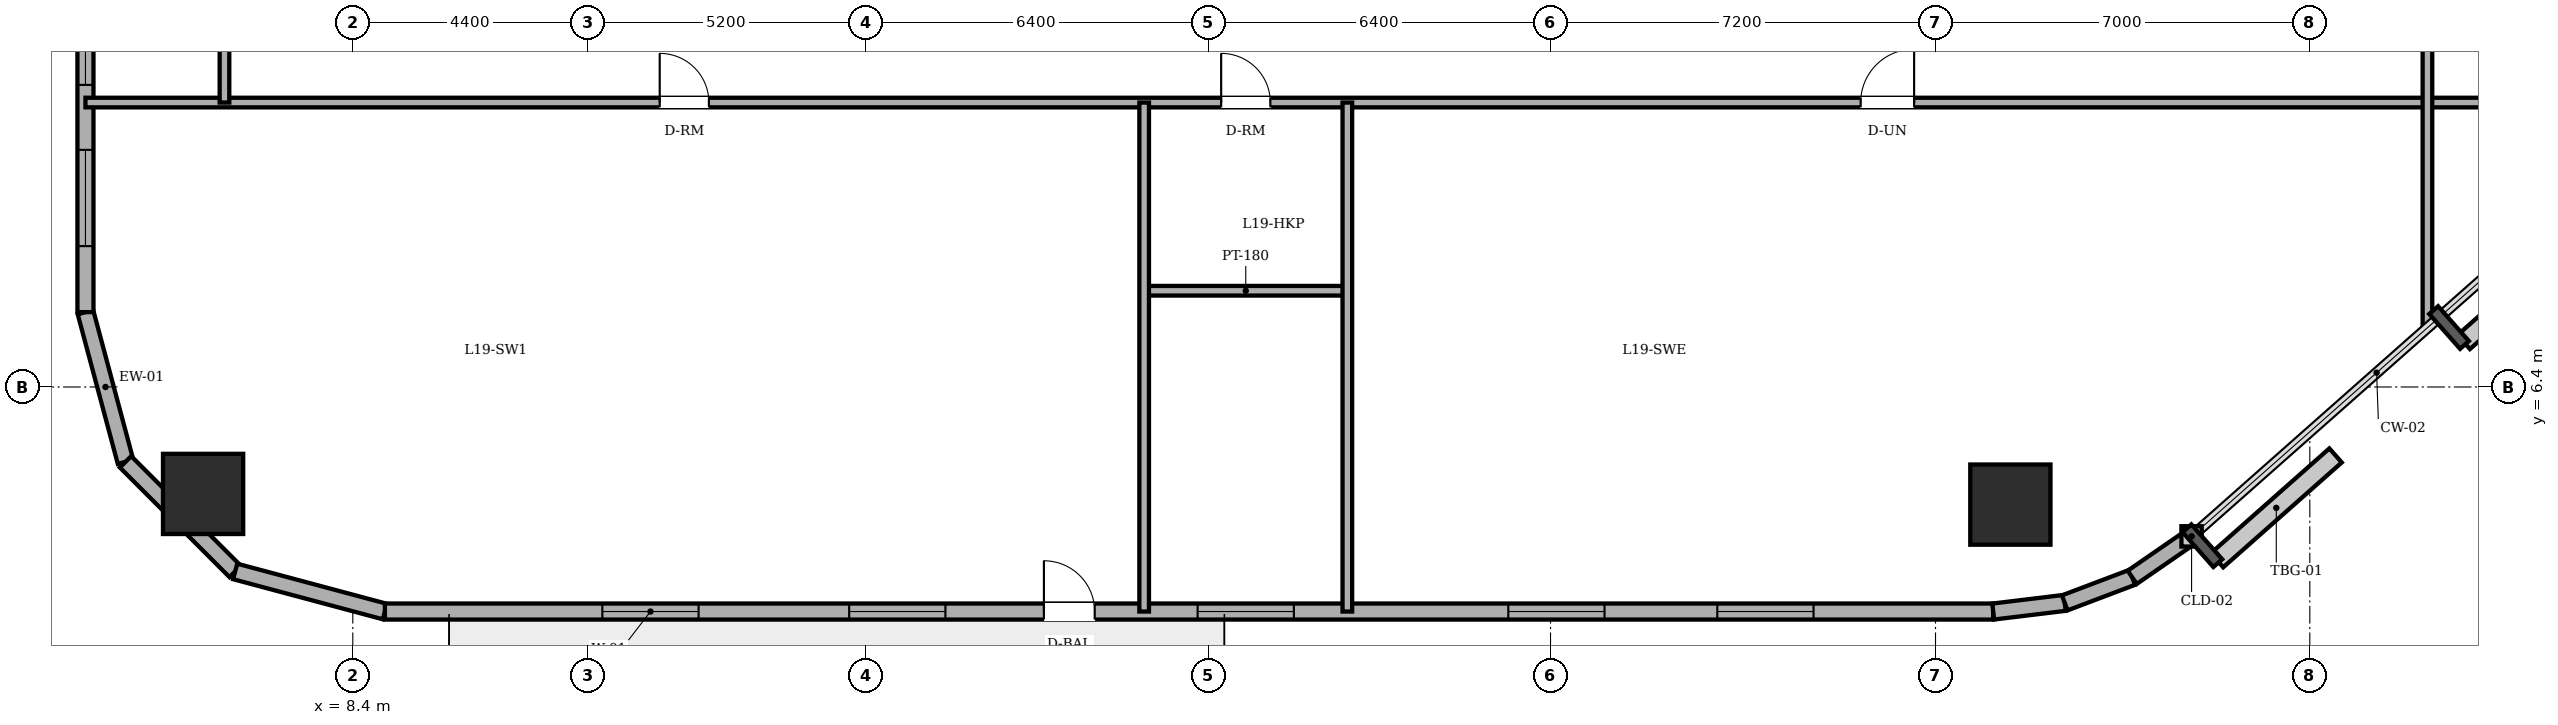
"""IFC4 building model, lengths in metres.
Left out: names, types, materials, properties, quantities, classifications, styles, units other than length and angle.
Written with IfcOpenShell. Run it as: python <this file> out.ifc"""

import sys

from ifc_helpers import new_model, si_unit, direction, frame, frame_2d, origin, origin_2d, place, context, subcontext, project, spatial, rectangle, circle, extrude, element, fill, save


model = new_model("IFC4")
c1 = context("Model", 3, precision=1e-05, world=origin(), true_north=direction((0.0, 1.0)))
c2 = subcontext(c1, "Body", "Model", "MODEL_VIEW")
j1 = project(units=[si_unit("LENGTHUNIT", "METRE"), si_unit("PLANEANGLEUNIT", "RADIAN")], contexts=[c1])
p1 = place(None, origin())
s1 = spatial("IfcSite", under=j1, at=p1, CompositionType="ELEMENT")
p2 = place(p1, origin())
s2 = spatial("IfcBuilding", under=s1, at=p2, CompositionType="ELEMENT")
p3 = place(p2, frame((0.0, 0.0, 72.0)))
s3 = spatial("IfcBuildingStorey", under=s2, at=p3, CompositionType="ELEMENT", Elevation=72.0)
for number, where, z_axis, x_axis in (
    (1, (5.6, 4.4, 0.0), (0.0, 0.0, 1.0), (1.0, 0.0, 0.0)),
    (2, (39.4, 4.2, 0.0), (0.0, 0.0, 1.0), (1.0, 0.0, 0.0)),
):
    element("IfcColumn", number, at=place(p3, frame(where, z_axis=z_axis, x_axis=x_axis)), inside=s3, PredefinedType="COLUMN", context=c2, shape_type="SweptSolid", body=[
        extrude(circle(Radius=0.75, at=origin_2d()), origin(), (0.0, 0.0, 1.0), 3.6),
    ])
p4 = place(p3, frame((3.4, 7.8, 0.0), z_axis=(0.0, 0.0, 1.0), x_axis=(0.258731875344, -0.96594917914, 0.0)))
e3 = element("IfcWall", 3, at=p4, inside=s3, PredefinedType="SOLIDWALL", context=c2, shape_type="SweptSolid", body=[
    extrude(rectangle(XDim=2.899, YDim=0.3, at=frame_2d((1.449, 0.0))), origin(), (0.0, 0.0, 1.0), 3.36),
])
p5 = place(p3, frame((4.15, 5.0, 0.0), z_axis=(0.0, 0.0, 1.0), x_axis=(0.707106781187, -0.707106781187, 0.0)))
e4 = element("IfcWall", 4, at=p5, inside=s3, PredefinedType="SOLIDWALL", context=c2, shape_type="SweptSolid", body=[
    extrude(rectangle(XDim=2.899, YDim=0.3, at=frame_2d((1.45, 0.0))), origin(), (0.0, 0.0, 1.0), 3.36),
])
p6 = place(p3, frame((6.2, 2.95, 0.0), z_axis=(0.0, 0.0, 1.0), x_axis=(0.96594917914, -0.258731875344, 0.0)))
e5 = element("IfcWall", 5, at=p6, inside=s3, PredefinedType="SOLIDWALL", context=c2, shape_type="SweptSolid", body=[
    extrude(rectangle(XDim=2.899, YDim=0.3, at=frame_2d((1.449, 0.0))), origin(), (0.0, 0.0, 1.0), 3.36),
])
p7 = place(p3, frame((9.0, 2.2, 0.0), z_axis=(0.0, 0.0, 1.0), x_axis=(1.0, 0.0, 0.0)))
e6 = element("IfcWall", 6, at=p7, inside=s3, PredefinedType="SOLIDWALL", context=c2, shape_type="SweptSolid", body=[
    extrude(rectangle(XDim=30.079, YDim=0.3, at=frame_2d((15.04, 0.0))), origin(), (0.0, 0.0, 1.0), 3.36),
])
p8 = place(p7, frame((12.325, 0.0, 0.0)))
e7 = element("IfcOpeningElement", 7, at=p8, cuts=e6, PredefinedType="OPENING", context=c2, shape_type="SweptSolid", body=[
    extrude(rectangle(XDim=0.95, YDim=2.2, at=frame_2d((0.475, 1.1))), frame((0.0, 0.16, 0.0), z_axis=(0.0, -1.0, 0.0), x_axis=(1.0, 0.0, 0.0)), (0.0, 0.0, 1.0), 0.32),
])
p9 = place(p7, frame((4.067, 0.0, 0.85)))
e8 = element("IfcOpeningElement", 8, at=p9, cuts=e6, PredefinedType="OPENING", context=c2, shape_type="SweptSolid", body=[
    extrude(rectangle(XDim=1.8, YDim=1.55, at=frame_2d((0.9, 0.775))), frame((0.0, 0.16, 0.0), z_axis=(0.0, -1.0, 0.0), x_axis=(1.0, 0.0, 0.0)), (0.0, 0.0, 1.0), 0.32),
])
p10 = place(p7, frame((8.683, 0.0, 0.85)))
e9 = element("IfcOpeningElement", 9, at=p10, cuts=e6, PredefinedType="OPENING", context=c2, shape_type="SweptSolid", body=[
    extrude(rectangle(XDim=1.8, YDim=1.55, at=frame_2d((0.9, 0.775))), frame((0.0, 0.16, 0.0), z_axis=(0.0, -1.0, 0.0), x_axis=(1.0, 0.0, 0.0)), (0.0, 0.0, 1.0), 0.32),
])
p11 = place(p7, frame((15.2, 0.0, 0.85)))
e10 = element("IfcOpeningElement", 10, at=p11, cuts=e6, PredefinedType="OPENING", context=c2, shape_type="SweptSolid", body=[
    extrude(rectangle(XDim=1.8, YDim=1.55, at=frame_2d((0.9, 0.775))), frame((0.0, 0.16, 0.0), z_axis=(0.0, -1.0, 0.0), x_axis=(1.0, 0.0, 0.0)), (0.0, 0.0, 1.0), 0.32),
])
p12 = place(p7, frame((21.01, 0.0, 0.85)))
e11 = element("IfcOpeningElement", 11, at=p12, cuts=e6, PredefinedType="OPENING", context=c2, shape_type="SweptSolid", body=[
    extrude(rectangle(XDim=1.8, YDim=1.55, at=frame_2d((0.9, 0.775))), frame((0.0, 0.16, 0.0), z_axis=(0.0, -1.0, 0.0), x_axis=(1.0, 0.0, 0.0)), (0.0, 0.0, 1.0), 0.32),
])
p13 = place(p7, frame((24.919, 0.0, 0.85)))
e12 = element("IfcOpeningElement", 12, at=p13, cuts=e6, PredefinedType="OPENING", context=c2, shape_type="SweptSolid", body=[
    extrude(rectangle(XDim=1.8, YDim=1.55, at=frame_2d((0.9, 0.775))), frame((0.0, 0.16, 0.0), z_axis=(0.0, -1.0, 0.0), x_axis=(1.0, 0.0, 0.0)), (0.0, 0.0, 1.0), 0.32),
])
p14 = place(p3, frame((39.079, 2.2, 0.0), z_axis=(0.0, 0.0, 1.0), x_axis=(0.992739027259, 0.120288086515, 0.0)))
e13 = element("IfcWall", 13, at=p14, inside=s3, PredefinedType="SOLIDWALL", context=c2, shape_type="SweptSolid", body=[
    extrude(rectangle(XDim=1.348, YDim=0.3, at=frame_2d((0.674, 0.0))), origin(), (0.0, 0.0, 1.0), 3.36),
])
p15 = place(p3, frame((40.417, 2.362, 0.0), z_axis=(0.0, 0.0, 1.0), x_axis=(0.935156721165, 0.354234254216, 0.0)))
e14 = element("IfcWall", 14, at=p15, inside=s3, PredefinedType="SOLIDWALL", context=c2, shape_type="SweptSolid", body=[
    extrude(rectangle(XDim=1.349, YDim=0.3, at=frame_2d((0.675, 0.0))), origin(), (0.0, 0.0, 1.0), 3.36),
])
p16 = place(p3, frame((41.679, 2.84, 0.0), z_axis=(0.0, 0.0, 1.0), x_axis=(0.823116500192, 0.567872544777, 0.0)))
e15 = element("IfcWall", 15, at=p16, inside=s3, PredefinedType="SOLIDWALL", context=c2, shape_type="SweptSolid", body=[
    extrude(rectangle(XDim=1.349, YDim=0.3, at=frame_2d((0.674, 0.0))), origin(), (0.0, 0.0, 1.0), 3.36),
])
p17 = place(p3, frame((3.4, 40.2, 0.0), z_axis=(0.0, 0.0, 1.0), x_axis=(0.0, -1.0, 0.0)))
e16 = element("IfcWall", 16, at=p17, inside=s3, PredefinedType="SOLIDWALL", context=c2, shape_type="SweptSolid", body=[
    extrude(rectangle(XDim=32.4, YDim=0.3, at=frame_2d((16.2, 0.0))), origin(), (0.0, 0.0, 1.0), 3.36),
])
p18 = place(p17, frame((1.235, 0.0, 0.85)))
e17 = element("IfcOpeningElement", 17, at=p18, cuts=e16, PredefinedType="OPENING", context=c2, shape_type="SweptSolid", body=[
    extrude(rectangle(XDim=1.8, YDim=1.55, at=frame_2d((0.9, 0.775))), frame((0.0, 0.16, 0.0), z_axis=(0.0, -1.0, 0.0), x_axis=(1.0, 0.0, 0.0)), (0.0, 0.0, 1.0), 0.32),
])
p19 = place(p17, frame((4.25, 0.0, 0.85)))
e18 = element("IfcOpeningElement", 18, at=p19, cuts=e16, PredefinedType="OPENING", context=c2, shape_type="SweptSolid", body=[
    extrude(rectangle(XDim=1.8, YDim=1.55, at=frame_2d((0.9, 0.775))), frame((0.0, 0.16, 0.0), z_axis=(0.0, -1.0, 0.0), x_axis=(1.0, 0.0, 0.0)), (0.0, 0.0, 1.0), 0.32),
])
p20 = place(p17, frame((9.253, 0.0, 0.85)))
e19 = element("IfcOpeningElement", 19, at=p20, cuts=e16, PredefinedType="OPENING", context=c2, shape_type="SweptSolid", body=[
    extrude(rectangle(XDim=1.8, YDim=1.55, at=frame_2d((0.9, 0.775))), frame((0.0, 0.16, 0.0), z_axis=(0.0, -1.0, 0.0), x_axis=(1.0, 0.0, 0.0)), (0.0, 0.0, 1.0), 0.32),
])
p21 = place(p17, frame((13.027, 0.0, 0.85)))
e20 = element("IfcOpeningElement", 20, at=p21, cuts=e16, PredefinedType="OPENING", context=c2, shape_type="SweptSolid", body=[
    extrude(rectangle(XDim=1.8, YDim=1.55, at=frame_2d((0.9, 0.775))), frame((0.0, 0.16, 0.0), z_axis=(0.0, -1.0, 0.0), x_axis=(1.0, 0.0, 0.0)), (0.0, 0.0, 1.0), 0.32),
])
p22 = place(p17, frame((19.573, 0.0, 0.85)))
e21 = element("IfcOpeningElement", 21, at=p22, cuts=e16, PredefinedType="OPENING", context=c2, shape_type="SweptSolid", body=[
    extrude(rectangle(XDim=1.8, YDim=1.55, at=frame_2d((0.9, 0.775))), frame((0.0, 0.16, 0.0), z_axis=(0.0, -1.0, 0.0), x_axis=(1.0, 0.0, 0.0)), (0.0, 0.0, 1.0), 0.32),
])
p23 = place(p17, frame((22.347, 0.0, 0.85)))
e22 = element("IfcOpeningElement", 22, at=p23, cuts=e16, PredefinedType="OPENING", context=c2, shape_type="SweptSolid", body=[
    extrude(rectangle(XDim=1.8, YDim=1.55, at=frame_2d((0.9, 0.775))), frame((0.0, 0.16, 0.0), z_axis=(0.0, -1.0, 0.0), x_axis=(1.0, 0.0, 0.0)), (0.0, 0.0, 1.0), 0.32),
])
p24 = place(p17, frame((26.35, 0.0, 0.85)))
e23 = element("IfcOpeningElement", 23, at=p24, cuts=e16, PredefinedType="OPENING", context=c2, shape_type="SweptSolid", body=[
    extrude(rectangle(XDim=1.8, YDim=1.55, at=frame_2d((0.9, 0.775))), frame((0.0, 0.16, 0.0), z_axis=(0.0, -1.0, 0.0), x_axis=(1.0, 0.0, 0.0)), (0.0, 0.0, 1.0), 0.32),
])
p25 = place(p17, frame((29.365, 0.0, 0.85)))
e24 = element("IfcOpeningElement", 24, at=p25, cuts=e16, PredefinedType="OPENING", context=c2, shape_type="SweptSolid", body=[
    extrude(rectangle(XDim=1.8, YDim=1.55, at=frame_2d((0.9, 0.775))), frame((0.0, 0.16, 0.0), z_axis=(0.0, -1.0, 0.0), x_axis=(1.0, 0.0, 0.0)), (0.0, 0.0, 1.0), 0.32),
])
p26 = place(p3, frame((23.2, 8.2, 0.0), z_axis=(0.0, 0.0, 1.0), x_axis=(1.0, 0.0, 0.0)))
e25 = element("IfcWall", 25, at=p26, inside=s3, PredefinedType="PARTITIONING", context=c2, shape_type="SweptSolid", body=[
    extrude(rectangle(XDim=3.8, YDim=0.18, at=frame_2d((1.9, 0.0))), origin(), (0.0, 0.0, 1.0), 3.36),
])
p27 = place(p3, frame((3.4, 11.72, 0.0), z_axis=(0.0, 0.0, 1.0), x_axis=(1.0, 0.0, 0.0)))
e26 = element("IfcWall", 26, at=p27, inside=s3, PredefinedType="PARTITIONING", context=c2, shape_type="SweptSolid", body=[
    extrude(rectangle(XDim=47.689, YDim=0.18, at=frame_2d((23.845, 0.0))), origin(), (0.0, 0.0, 1.0), 3.36),
])
p28 = place(p27, frame((21.24, 0.0, 0.0)))
e27 = element("IfcOpeningElement", 27, at=p28, cuts=e26, PredefinedType="OPENING", context=c2, shape_type="SweptSolid", body=[
    extrude(rectangle(XDim=0.92, YDim=2.1, at=frame_2d((0.46, 1.05))), frame((0.0, 0.1, 0.0), z_axis=(0.0, -1.0, 0.0), x_axis=(1.0, 0.0, 0.0)), (0.0, 0.0, 1.0), 0.2),
])
p29 = place(p27, frame((10.74, 0.0, 0.0)))
e28 = element("IfcOpeningElement", 28, at=p29, cuts=e26, PredefinedType="OPENING", context=c2, shape_type="SweptSolid", body=[
    extrude(rectangle(XDim=0.92, YDim=2.1, at=frame_2d((0.46, 1.05))), frame((0.0, 0.1, 0.0), z_axis=(0.0, -1.0, 0.0), x_axis=(1.0, 0.0, 0.0)), (0.0, 0.0, 1.0), 0.2),
])
p30 = place(p27, frame((33.2, 0.0, 0.0)))
e29 = element("IfcOpeningElement", 29, at=p30, cuts=e26, PredefinedType="OPENING", context=c2, shape_type="SweptSolid", body=[
    extrude(rectangle(XDim=1.0, YDim=2.15, at=frame_2d((0.5, 1.075))), frame((0.0, 0.1, 0.0), z_axis=(0.0, -1.0, 0.0), x_axis=(1.0, 0.0, 0.0)), (0.0, 0.0, 1.0), 0.2),
])
p31 = place(p3, frame((6.0, 11.72, 0.0), z_axis=(0.0, 0.0, 1.0), x_axis=(0.0, 1.0, 0.0)))
e30 = element("IfcWall", 30, at=p31, inside=s3, PredefinedType="PARTITIONING", context=c2, shape_type="SweptSolid", body=[
    extrude(rectangle(XDim=2.46, YDim=0.18, at=frame_2d((1.23, 0.0))), origin(), (0.0, 0.0, 1.0), 3.36),
])
for number, where, z_axis, x_axis in (
    (31, (23.2, 2.2, 0.0), (0.0, 0.0, 1.0), (0.0, 1.0, 0.0)),
    (32, (27.0, 2.2, 0.0), (0.0, 0.0, 1.0), (0.0, 1.0, 0.0)),
):
    element("IfcWall", number, at=place(p3, frame(where, z_axis=z_axis, x_axis=x_axis)), inside=s3, PredefinedType="PARTITIONING", context=c2, shape_type="SweptSolid", body=[
        extrude(rectangle(XDim=9.52, YDim=0.18, at=frame_2d((4.76, 0.0))), origin(), (0.0, 0.0, 1.0), 3.36),
    ])
p32 = place(p3, frame((47.2, 7.508, 0.0), z_axis=(0.0, 0.0, 1.0), x_axis=(0.0, 1.0, 0.0)))
e33 = element("IfcWall", 33, at=p32, inside=s3, PredefinedType="PARTITIONING", context=c2, shape_type="SweptSolid", body=[
    extrude(rectangle(XDim=22.842, YDim=0.18, at=frame_2d((11.421, 0.0))), origin(), (0.0, 0.0, 1.0), 3.36),
])
p33 = place(p32, frame((18.447, 0.0, 0.0)))
e34 = element("IfcOpeningElement", 34, at=p33, cuts=e33, PredefinedType="OPENING", context=c2, shape_type="SweptSolid", body=[
    extrude(rectangle(XDim=0.92, YDim=2.1, at=frame_2d((0.46, 1.05))), frame((0.0, 0.1, 0.0), z_axis=(0.0, -1.0, 0.0), x_axis=(1.0, 0.0, 0.0)), (0.0, 0.0, 1.0), 0.2),
])
p34 = place(p32, frame((11.524, 0.0, 0.0)))
e35 = element("IfcOpeningElement", 35, at=p34, cuts=e33, PredefinedType="OPENING", context=c2, shape_type="SweptSolid", body=[
    extrude(rectangle(XDim=0.92, YDim=2.1, at=frame_2d((0.46, 1.05))), frame((0.0, 0.1, 0.0), z_axis=(0.0, -1.0, 0.0), x_axis=(1.0, 0.0, 0.0)), (0.0, 0.0, 1.0), 0.2),
])
p35 = place(p8, origin())
e36 = element("IfcDoor", 36, at=p35, inside=s3, OperationType="SINGLE_SWING_LEFT", PredefinedType="DOOR", context=c2, shape_type="SweptSolid", body=[
    extrude(rectangle(XDim=0.95, YDim=2.2, at=frame_2d((0.475, 1.1))), frame((0.0, 0.025, 0.0), z_axis=(0.0, -1.0, 0.0), x_axis=(1.0, 0.0, 0.0)), (0.0, 0.0, 1.0), 0.05),
])
fill(e7, e36)
p36 = place(p9, origin())
e37 = element("IfcWindow", 37, at=p36, inside=s3, PartitioningType="DOUBLE_PANEL_VERTICAL", PredefinedType="WINDOW", context=c2, shape_type="SweptSolid", body=[
    extrude(rectangle(XDim=1.8, YDim=1.55, at=frame_2d((0.9, 0.775))), frame((0.0, 0.03, 0.0), z_axis=(0.0, -1.0, 0.0), x_axis=(1.0, 0.0, 0.0)), (0.0, 0.0, 1.0), 0.06),
])
fill(e8, e37)
p37 = place(p10, origin())
e38 = element("IfcWindow", 38, at=p37, inside=s3, PartitioningType="DOUBLE_PANEL_VERTICAL", PredefinedType="WINDOW", context=c2, shape_type="SweptSolid", body=[
    extrude(rectangle(XDim=1.8, YDim=1.55, at=frame_2d((0.9, 0.775))), frame((0.0, 0.03, 0.0), z_axis=(0.0, -1.0, 0.0), x_axis=(1.0, 0.0, 0.0)), (0.0, 0.0, 1.0), 0.06),
])
fill(e9, e38)
p38 = place(p11, origin())
e39 = element("IfcWindow", 39, at=p38, inside=s3, PartitioningType="DOUBLE_PANEL_VERTICAL", PredefinedType="WINDOW", context=c2, shape_type="SweptSolid", body=[
    extrude(rectangle(XDim=1.8, YDim=1.55, at=frame_2d((0.9, 0.775))), frame((0.0, 0.03, 0.0), z_axis=(0.0, -1.0, 0.0), x_axis=(1.0, 0.0, 0.0)), (0.0, 0.0, 1.0), 0.06),
])
fill(e10, e39)
p39 = place(p12, origin())
e40 = element("IfcWindow", 40, at=p39, inside=s3, PartitioningType="DOUBLE_PANEL_VERTICAL", PredefinedType="WINDOW", context=c2, shape_type="SweptSolid", body=[
    extrude(rectangle(XDim=1.8, YDim=1.55, at=frame_2d((0.9, 0.775))), frame((0.0, 0.03, 0.0), z_axis=(0.0, -1.0, 0.0), x_axis=(1.0, 0.0, 0.0)), (0.0, 0.0, 1.0), 0.06),
])
fill(e11, e40)
p40 = place(p13, origin())
e41 = element("IfcWindow", 41, at=p40, inside=s3, PartitioningType="DOUBLE_PANEL_VERTICAL", PredefinedType="WINDOW", context=c2, shape_type="SweptSolid", body=[
    extrude(rectangle(XDim=1.8, YDim=1.55, at=frame_2d((0.9, 0.775))), frame((0.0, 0.03, 0.0), z_axis=(0.0, -1.0, 0.0), x_axis=(1.0, 0.0, 0.0)), (0.0, 0.0, 1.0), 0.06),
])
fill(e12, e41)
p41 = place(p24, origin())
e42 = element("IfcWindow", 42, at=p41, inside=s3, PartitioningType="DOUBLE_PANEL_VERTICAL", PredefinedType="WINDOW", context=c2, shape_type="SweptSolid", body=[
    extrude(rectangle(XDim=1.8, YDim=1.55, at=frame_2d((0.9, 0.775))), frame((0.0, 0.03, 0.0), z_axis=(0.0, -1.0, 0.0), x_axis=(1.0, 0.0, 0.0)), (0.0, 0.0, 1.0), 0.06),
])
fill(e23, e42)
p42 = place(p25, origin())
e43 = element("IfcWindow", 43, at=p42, inside=s3, PartitioningType="DOUBLE_PANEL_VERTICAL", PredefinedType="WINDOW", context=c2, shape_type="SweptSolid", body=[
    extrude(rectangle(XDim=1.8, YDim=1.55, at=frame_2d((0.9, 0.775))), frame((0.0, 0.03, 0.0), z_axis=(0.0, -1.0, 0.0), x_axis=(1.0, 0.0, 0.0)), (0.0, 0.0, 1.0), 0.06),
])
fill(e24, e43)
p43 = place(p28, origin())
e44 = element("IfcDoor", 44, at=p43, inside=s3, OperationType="SINGLE_SWING_LEFT", PredefinedType="DOOR", context=c2, shape_type="SweptSolid", body=[
    extrude(rectangle(XDim=0.92, YDim=2.1, at=frame_2d((0.46, 1.05))), frame((0.0, 0.025, 0.0), z_axis=(0.0, -1.0, 0.0), x_axis=(1.0, 0.0, 0.0)), (0.0, 0.0, 1.0), 0.05),
])
fill(e27, e44)
p44 = place(p29, origin())
e45 = element("IfcDoor", 45, at=p44, inside=s3, OperationType="SINGLE_SWING_LEFT", PredefinedType="DOOR", context=c2, shape_type="SweptSolid", body=[
    extrude(rectangle(XDim=0.92, YDim=2.1, at=frame_2d((0.46, 1.05))), frame((0.0, 0.025, 0.0), z_axis=(0.0, -1.0, 0.0), x_axis=(1.0, 0.0, 0.0)), (0.0, 0.0, 1.0), 0.05),
])
fill(e28, e45)
p45 = place(p30, origin())
e46 = element("IfcDoor", 46, at=p45, inside=s3, OperationType="SINGLE_SWING_RIGHT", PredefinedType="DOOR", context=c2, shape_type="SweptSolid", body=[
    extrude(rectangle(XDim=1.0, YDim=2.15, at=frame_2d((0.5, 1.075))), frame((0.0, 0.025, 0.0), z_axis=(0.0, -1.0, 0.0), x_axis=(1.0, 0.0, 0.0)), (0.0, 0.0, 1.0), 0.05),
])
fill(e29, e46)
save(model, sys.argv[1])
